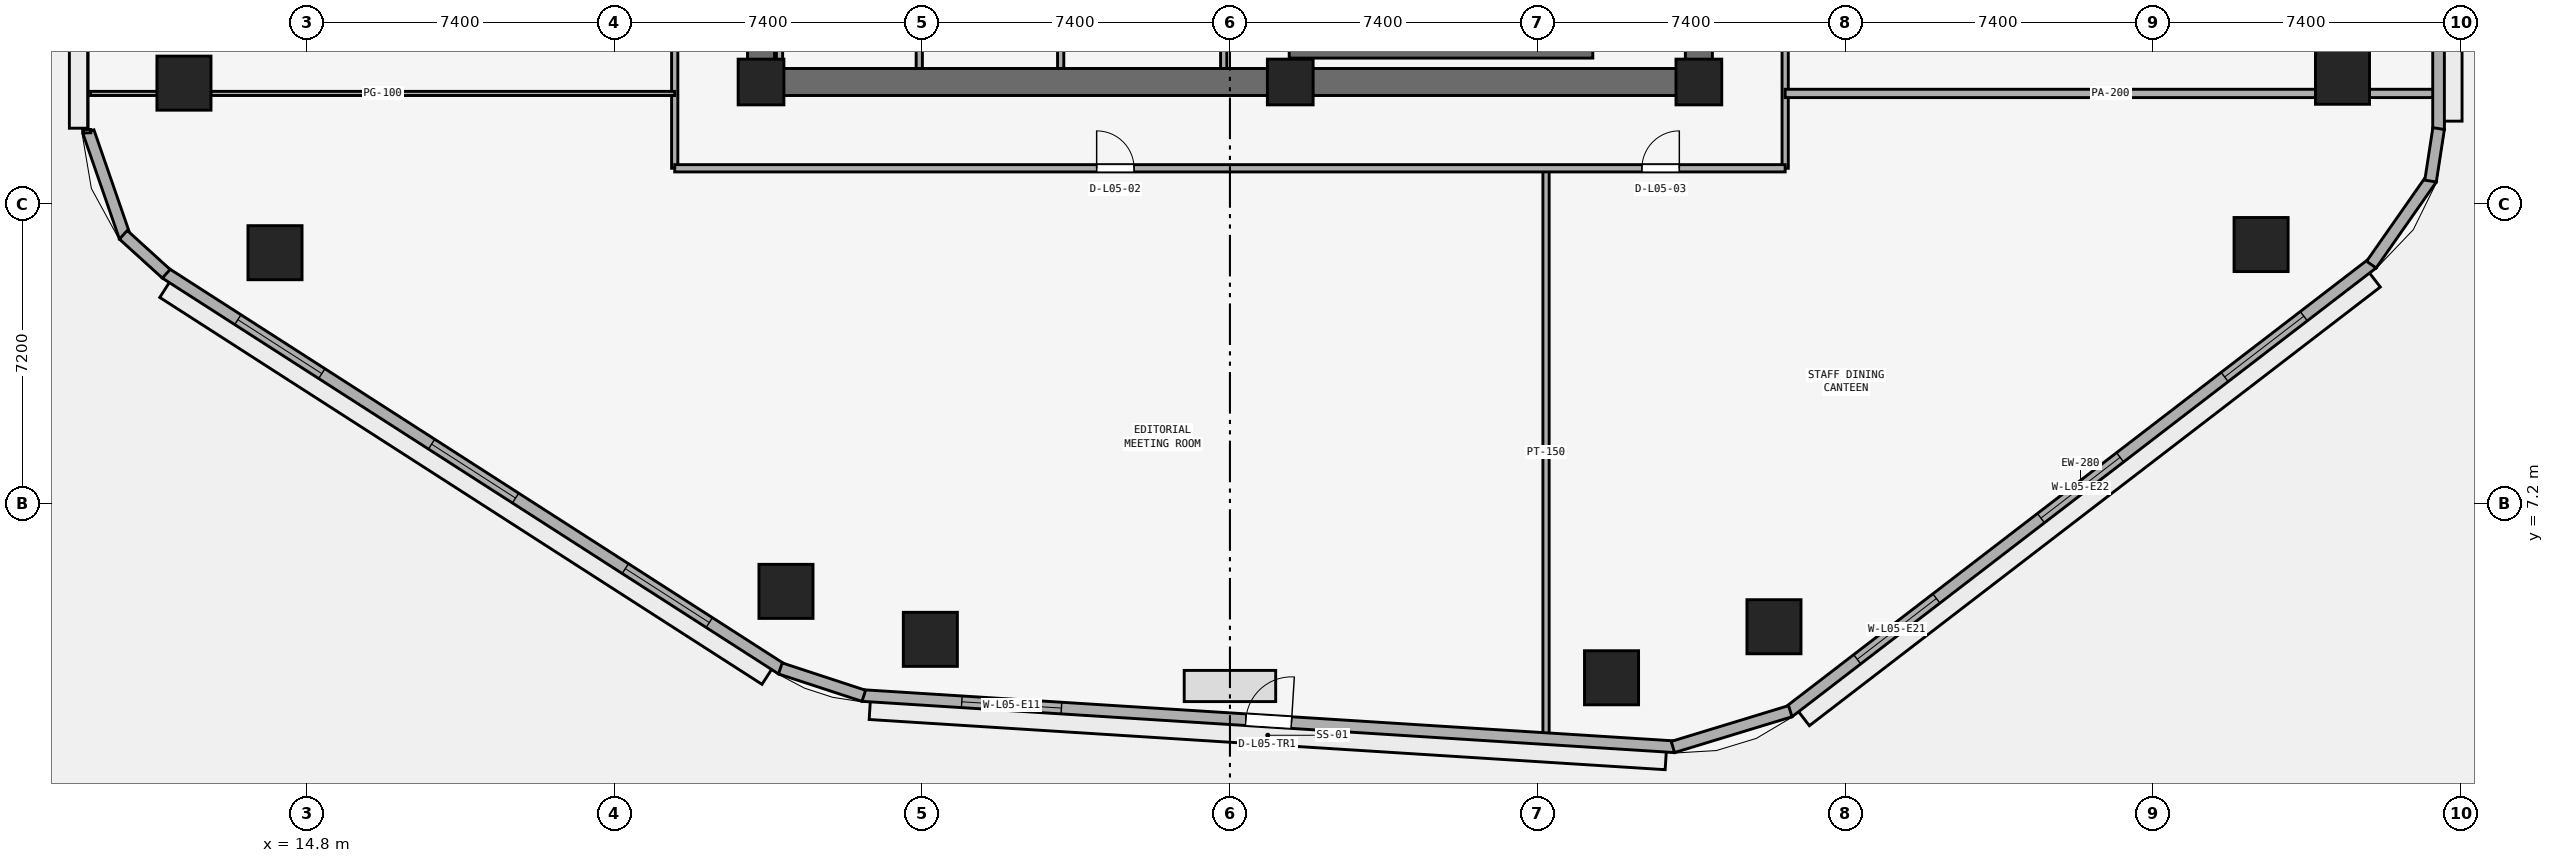
"""IFC4 building model, lengths in metres.
Left out: names, types, materials, properties, quantities, classifications, styles, units other than length and angle.
Written with IfcOpenShell. Run it as: python <this file> out.ifc"""

import sys

from ifc_helpers import new_model, si_unit, direction, frame, frame_2d, origin, origin_2d, place, context, subcontext, project, spatial, rectangle, extrude, element, fill, save


model = new_model("IFC4")
c1 = context("Model", 3, precision=1e-05, world=origin(), true_north=direction((0.0, 1.0)))
c2 = subcontext(c1, "Body", "Model", "MODEL_VIEW")
j1 = project(units=[si_unit("LENGTHUNIT", "METRE"), si_unit("PLANEANGLEUNIT", "RADIAN")], contexts=[c1])
p1 = place(None, origin())
s1 = spatial("IfcSite", under=j1, at=p1, CompositionType="ELEMENT")
p2 = place(p1, origin())
s2 = spatial("IfcBuilding", under=s1, at=p2, CompositionType="ELEMENT")
p3 = place(p2, frame((0.0, 0.0, 25.0)))
s3 = spatial("IfcBuildingStorey", under=s2, at=p3, CompositionType="ELEMENT", Elevation=25.0)
p4 = place(p3, frame((25.4, 17.325, 0.0), z_axis=(0.0, 0.0, 1.0), x_axis=(1.0, 0.0, 0.0)))
e1 = element("IfcWall", 1, at=p4, inside=s3, PredefinedType="SHEAR", context=c2, shape_type="SweptSolid", body=[
    extrude(rectangle(XDim=23.2, YDim=0.65, at=frame_2d((11.6, 0.0))), origin(), (0.0, 0.0, 1.0), 3.525),
])
p5 = place(p3, frame((25.725, 17.65, 0.0), z_axis=(0.0, 0.0, 1.0), x_axis=(0.0, 1.0, 0.0)))
e2 = element("IfcWall", 2, at=p5, inside=s3, PredefinedType="SHEAR", context=c2, shape_type="SweptSolid", body=[
    extrude(rectangle(XDim=15.1, YDim=0.65, at=frame_2d((7.55, 0.0))), origin(), (0.0, 0.0, 1.0), 3.525),
])
p6 = place(p5, frame((6.8, 0.0, 0.0)))
e3 = element("IfcOpeningElement", 3, at=p6, cuts=e2, PredefinedType="OPENING", context=c2, shape_type="SweptSolid", body=[
    extrude(rectangle(XDim=1.5, YDim=2.15, at=frame_2d((0.75, 1.075))), frame((0.0, 0.335, 0.0), z_axis=(0.0, -1.0, 0.0), x_axis=(1.0, 0.0, 0.0)), (0.0, 0.0, 1.0), 0.67),
])
p7 = place(p3, frame((48.275, 17.65, 0.0), z_axis=(0.0, 0.0, 1.0), x_axis=(0.0, 1.0, 0.0)))
e4 = element("IfcWall", 4, at=p7, inside=s3, PredefinedType="SHEAR", context=c2, shape_type="SweptSolid", body=[
    extrude(rectangle(XDim=15.1, YDim=0.65, at=frame_2d((7.55, 0.0))), origin(), (0.0, 0.0, 1.0), 3.525),
])
p8 = place(p7, frame((5.65, 0.0, 0.0)))
e5 = element("IfcOpeningElement", 5, at=p8, cuts=e4, PredefinedType="OPENING", context=c2, shape_type="SweptSolid", body=[
    extrude(rectangle(XDim=1.5, YDim=2.15, at=frame_2d((0.75, 1.075))), frame((0.0, 0.335, 0.0), z_axis=(0.0, -1.0, 0.0), x_axis=(1.0, 0.0, 0.0)), (0.0, 0.0, 1.0), 0.67),
])
for number, where, z_axis, x_axis in (
    (6, (25.725, 17.325, 0.0), (0.0, 0.0, 1.0), (1.0, 0.0, 0.0)),
    (7, (38.45, 17.325, 0.0), (0.0, 0.0, 1.0), (1.0, 0.0, 0.0)),
    (8, (48.275, 17.325, 0.0), (0.0, 0.0, 1.0), (1.0, 0.0, 0.0)),
):
    element("IfcColumn", number, at=place(p3, frame(where, z_axis=z_axis, x_axis=x_axis)), inside=s3, PredefinedType="PILASTER", context=c2, shape_type="SweptSolid", body=[
        extrude(rectangle(XDim=1.1, YDim=1.1, at=origin_2d()), origin(), (0.0, 0.0, 1.0), 3.8),
    ])
for number, where, z_axis, x_axis in (
    (9, (29.796, 3.922, 0.0), (0.0, 0.0, 1.0), (1.0, 0.0, 0.0)),
    (10, (46.175, 2.998, 0.0), (0.0, 0.0, 1.0), (1.0, 0.0, 0.0)),
    (11, (50.081, 4.225, 0.0), (0.0, 0.0, 1.0), (1.0, 0.0, 0.0)),
    (12, (61.793, 13.416, 0.0), (0.0, 0.0, 1.0), (1.0, 0.0, 0.0)),
    (13, (63.75, 17.44, 0.0), (0.0, 0.0, 1.0), (1.0, 0.0, 0.0)),
    (14, (11.85, 17.298, 0.0), (0.0, 0.0, 1.0), (1.0, 0.0, 0.0)),
    (15, (14.039, 13.22, 0.0), (0.0, 0.0, 1.0), (1.0, 0.0, 0.0)),
    (16, (26.325, 5.076, 0.0), (0.0, 0.0, 1.0), (1.0, 0.0, 0.0)),
):
    element("IfcColumn", number, at=place(p3, frame(where, z_axis=z_axis, x_axis=x_axis)), inside=s3, PredefinedType="COLUMN", context=c2, shape_type="SweptSolid", body=[
        extrude(rectangle(XDim=1.3, YDim=1.3, at=origin_2d()), origin(), (0.0, 0.0, 1.0), 3.8),
    ])
p9 = place(p3, frame((38.425, 18.025, 0.0), z_axis=(0.0, 0.0, 1.0), x_axis=(1.0, 0.0, 0.0)))
e17 = element("IfcWall", 17, at=p9, inside=s3, PredefinedType="SHEAR", context=c2, shape_type="SweptSolid", body=[
    extrude(rectangle(XDim=7.3, YDim=0.25, at=frame_2d((3.65, 0.0))), origin(), (0.0, 0.0, 1.0), 3.525),
])
for number, where, z_axis, x_axis in (
    (18, (26.17, 17.65, 0.0), (0.0, 0.0, 1.0), (0.0, 1.0, 0.0)),
    (19, (29.53, 17.65, 0.0), (0.0, 0.0, 1.0), (0.0, 1.0, 0.0)),
    (20, (32.93, 17.65, 0.0), (0.0, 0.0, 1.0), (0.0, 1.0, 0.0)),
    (21, (36.85, 17.65, 0.0), (0.0, 0.0, 1.0), (0.0, 1.0, 0.0)),
):
    element("IfcWall", number, at=place(p3, frame(where, z_axis=z_axis, x_axis=x_axis)), inside=s3, PredefinedType="PARTITIONING", context=c2, shape_type="SweptSolid", body=[
        extrude(rectangle(XDim=2.1, YDim=0.15, at=frame_2d((1.05, 0.0))), origin(), (0.0, 0.0, 1.0), 3.525),
    ])
p10 = place(p3, frame((50.35, 15.25, 0.0), z_axis=(0.0, 0.0, 1.0), x_axis=(0.0, 1.0, 0.0)))
e22 = element("IfcWall", 22, at=p10, inside=s3, PredefinedType="PARTITIONING", context=c2, shape_type="SweptSolid", body=[
    extrude(rectangle(XDim=19.9, YDim=0.15, at=frame_2d((9.95, 0.0))), origin(), (0.0, 0.0, 1.0), 3.525),
])
p11 = place(p10, frame((7.825, 0.0, 0.0)))
e23 = element("IfcOpeningElement", 23, at=p11, cuts=e22, PredefinedType="OPENING", context=c2, shape_type="SweptSolid", body=[
    extrude(rectangle(XDim=0.9, YDim=2.1, at=frame_2d((0.45, 1.05))), frame((0.0, 0.085, 0.0), z_axis=(0.0, -1.0, 0.0), x_axis=(1.0, 0.0, 0.0)), (0.0, 0.0, 1.0), 0.17),
])
p12 = place(p10, frame((15.925, 0.0, 0.0)))
e24 = element("IfcOpeningElement", 24, at=p12, cuts=e22, PredefinedType="OPENING", context=c2, shape_type="SweptSolid", body=[
    extrude(rectangle(XDim=1.0, YDim=2.12, at=frame_2d((0.5, 1.06))), frame((0.0, 0.085, 0.0), z_axis=(0.0, -1.0, 0.0), x_axis=(1.0, 0.0, 0.0)), (0.0, 0.0, 1.0), 0.17),
])
p13 = place(p3, frame((44.6, 1.599, 0.0), z_axis=(0.0, 0.0, 1.0), x_axis=(0.0, 1.0, 0.0)))
e25 = element("IfcWall", 25, at=p13, inside=s3, PredefinedType="PARTITIONING", context=c2, shape_type="SweptSolid", body=[
    extrude(rectangle(XDim=13.651, YDim=0.15, at=frame_2d((6.825, 0.0))), origin(), (0.0, 0.0, 1.0), 3.525),
])
p14 = place(p3, frame((23.65, 15.25, 0.0), z_axis=(0.0, 0.0, 1.0), x_axis=(0.0, 1.0, 0.0)))
e26 = element("IfcWall", 26, at=p14, inside=s3, PredefinedType="PARTITIONING", context=c2, shape_type="SweptSolid", body=[
    extrude(rectangle(XDim=19.9, YDim=0.15, at=frame_2d((9.95, 0.0))), origin(), (0.0, 0.0, 1.0), 3.525),
])
p15 = place(p14, frame((9.5, 0.0, 0.0)))
e27 = element("IfcOpeningElement", 27, at=p15, cuts=e26, PredefinedType="OPENING", context=c2, shape_type="SweptSolid", body=[
    extrude(rectangle(XDim=0.9, YDim=2.1, at=frame_2d((0.45, 1.05))), frame((0.0, 0.085, 0.0), z_axis=(0.0, -1.0, 0.0), x_axis=(1.0, 0.0, 0.0)), (0.0, 0.0, 1.0), 0.17),
])
p16 = place(p3, frame((23.65, 15.25, 0.0), z_axis=(0.0, 0.0, 1.0), x_axis=(1.0, 0.0, 0.0)))
e28 = element("IfcWall", 28, at=p16, inside=s3, PredefinedType="PARTITIONING", context=c2, shape_type="SweptSolid", body=[
    extrude(rectangle(XDim=26.7, YDim=0.175, at=frame_2d((13.35, 0.0))), origin(), (0.0, 0.0, 1.0), 3.525),
])
p17 = place(p16, frame((10.145, 0.0, 0.0)))
e29 = element("IfcOpeningElement", 29, at=p17, cuts=e28, PredefinedType="OPENING", context=c2, shape_type="SweptSolid", body=[
    extrude(rectangle(XDim=0.9, YDim=2.1, at=frame_2d((0.45, 1.05))), frame((0.0, 0.097, 0.0), z_axis=(0.0, -1.0, 0.0), x_axis=(1.0, 0.0, 0.0)), (0.0, 0.0, 1.0), 0.195),
])
p18 = place(p16, frame((23.255, 0.0, 0.0)))
e30 = element("IfcOpeningElement", 30, at=p18, cuts=e28, PredefinedType="OPENING", context=c2, shape_type="SweptSolid", body=[
    extrude(rectangle(XDim=0.9, YDim=2.1, at=frame_2d((0.45, 1.05))), frame((0.0, 0.097, 0.0), z_axis=(0.0, -1.0, 0.0), x_axis=(1.0, 0.0, 0.0)), (0.0, 0.0, 1.0), 0.195),
])
p19 = place(p3, frame((9.605, 17.05, 0.0), z_axis=(0.0, 0.0, 1.0), x_axis=(1.0, 0.0, 0.0)))
e31 = element("IfcWall", 31, at=p19, inside=s3, PredefinedType="PARTITIONING", context=c2, shape_type="SweptSolid", body=[
    extrude(rectangle(XDim=14.045, YDim=0.1, at=frame_2d((7.022, 0.0))), origin(), (0.0, 0.0, 1.0), 3.525),
])
p20 = place(p3, frame((50.35, 17.05, 0.0), z_axis=(0.0, 0.0, 1.0), x_axis=(1.0, 0.0, 0.0)))
e32 = element("IfcWall", 32, at=p20, inside=s3, PredefinedType="PARTITIONING", context=c2, shape_type="SweptSolid", body=[
    extrude(rectangle(XDim=15.645, YDim=0.2, at=frame_2d((7.823, 0.0))), origin(), (0.0, 0.0, 1.0), 3.525),
])
p21 = place(p3, frame((28.161, 2.571, 0.0), z_axis=(0.0, 0.0, 1.0), x_axis=(0.998017288298, -0.06294038654, 0.0)))
e33 = element("IfcWall", 33, at=p21, inside=s3, PredefinedType="STANDARD", context=c2, shape_type="SweptSolid", body=[
    extrude(rectangle(XDim=19.577, YDim=0.28, at=frame_2d((9.789, 0.0))), origin(), (0.0, 0.0, 1.0), 3.525),
])
p22 = place(p21, frame((9.238, 0.0, 0.0)))
e34 = element("IfcOpeningElement", 34, at=p22, cuts=e33, PredefinedType="OPENING", context=c2, shape_type="SweptSolid", body=[
    extrude(rectangle(XDim=1.1, YDim=2.2, at=frame_2d((0.55, 1.1))), frame((0.0, 0.15, 0.0), z_axis=(0.0, -1.0, 0.0), x_axis=(1.0, 0.0, 0.0)), (0.0, 0.0, 1.0), 0.3),
])
p23 = place(p21, frame((2.396, 0.0, 0.9)))
e35 = element("IfcOpeningElement", 35, at=p23, cuts=e33, PredefinedType="OPENING", context=c2, shape_type="SweptSolid", body=[
    extrude(rectangle(XDim=2.4, YDim=1.75, at=frame_2d((1.2, 0.875))), frame((0.0, 0.15, 0.0), z_axis=(0.0, -1.0, 0.0), x_axis=(1.0, 0.0, 0.0)), (0.0, 0.0, 1.0), 0.3),
])
p24 = place(p3, frame((50.429, 2.172, 0.0), z_axis=(0.0, 0.0, 1.0), x_axis=(0.792937466367, 0.609303023488, 0.0)))
e36 = element("IfcWall", 36, at=p24, inside=s3, PredefinedType="STANDARD", context=c2, shape_type="SweptSolid", body=[
    extrude(rectangle(XDim=17.713, YDim=0.28, at=frame_2d((8.856, 0.0))), origin(), (0.0, 0.0, 1.0), 3.525),
])
p25 = place(p24, frame((2.085, 0.0, 0.9)))
e37 = element("IfcOpeningElement", 37, at=p25, cuts=e36, PredefinedType="OPENING", context=c2, shape_type="SweptSolid", body=[
    extrude(rectangle(XDim=2.4, YDim=1.75, at=frame_2d((1.2, 0.875))), frame((0.0, 0.15, 0.0), z_axis=(0.0, -1.0, 0.0), x_axis=(1.0, 0.0, 0.0)), (0.0, 0.0, 1.0), 0.3),
])
p26 = place(p24, frame((7.656, 0.0, 0.9)))
e38 = element("IfcOpeningElement", 38, at=p26, cuts=e36, PredefinedType="OPENING", context=c2, shape_type="SweptSolid", body=[
    extrude(rectangle(XDim=2.4, YDim=1.75, at=frame_2d((1.2, 0.875))), frame((0.0, 0.15, 0.0), z_axis=(0.0, -1.0, 0.0), x_axis=(1.0, 0.0, 0.0)), (0.0, 0.0, 1.0), 0.3),
])
p27 = place(p24, frame((13.227, 0.0, 0.9)))
e39 = element("IfcOpeningElement", 39, at=p27, cuts=e36, PredefinedType="OPENING", context=c2, shape_type="SweptSolid", body=[
    extrude(rectangle(XDim=2.4, YDim=1.75, at=frame_2d((1.2, 0.875))), frame((0.0, 0.15, 0.0), z_axis=(0.0, -1.0, 0.0), x_axis=(1.0, 0.0, 0.0)), (0.0, 0.0, 1.0), 0.3),
])
p28 = place(p3, frame((66.06, 16.183, 0.0), z_axis=(0.0, 0.0, 1.0), x_axis=(0.0, 1.0, 0.0)))
e40 = element("IfcWall", 40, at=p28, inside=s3, PredefinedType="STANDARD", context=c2, shape_type="SweptSolid", body=[
    extrude(rectangle(XDim=19.331, YDim=0.28, at=frame_2d((9.666, 0.0))), origin(), (0.0, 0.0, 1.0), 3.525),
])
p29 = place(p28, frame((9.115, 0.0, 0.0)))
e41 = element("IfcOpeningElement", 41, at=p29, cuts=e40, PredefinedType="OPENING", context=c2, shape_type="SweptSolid", body=[
    extrude(rectangle(XDim=1.1, YDim=2.2, at=frame_2d((0.55, 1.1))), frame((0.0, 0.15, 0.0), z_axis=(0.0, -1.0, 0.0), x_axis=(1.0, 0.0, 0.0)), (0.0, 0.0, 1.0), 0.3),
])
p30 = place(p28, frame((2.355, 0.0, 0.9)))
e42 = element("IfcOpeningElement", 42, at=p30, cuts=e40, PredefinedType="OPENING", context=c2, shape_type="SweptSolid", body=[
    extrude(rectangle(XDim=2.4, YDim=1.75, at=frame_2d((1.2, 0.875))), frame((0.0, 0.15, 0.0), z_axis=(0.0, -1.0, 0.0), x_axis=(1.0, 0.0, 0.0)), (0.0, 0.0, 1.0), 0.3),
])
p31 = place(p28, frame((14.326, 0.0, 0.9)))
e43 = element("IfcOpeningElement", 43, at=p31, cuts=e40, PredefinedType="OPENING", context=c2, shape_type="SweptSolid", body=[
    extrude(rectangle(XDim=2.4, YDim=1.75, at=frame_2d((1.2, 0.875))), frame((0.0, 0.15, 0.0), z_axis=(0.0, -1.0, 0.0), x_axis=(1.0, 0.0, 0.0)), (0.0, 0.0, 1.0), 0.3),
])
p32 = place(p3, frame((11.405, 12.728, 0.0), z_axis=(0.0, 0.0, 1.0), x_axis=(0.841304564637, -0.540561402175, 0.0)))
e44 = element("IfcWall", 44, at=p32, inside=s3, PredefinedType="STANDARD", context=c2, shape_type="SweptSolid", body=[
    extrude(rectangle(XDim=17.612, YDim=0.28, at=frame_2d((8.806, 0.0))), origin(), (0.0, 0.0, 1.0), 3.525),
])
p33 = place(p32, frame((2.069, 0.0, 0.9)))
e45 = element("IfcOpeningElement", 45, at=p33, cuts=e44, PredefinedType="OPENING", context=c2, shape_type="SweptSolid", body=[
    extrude(rectangle(XDim=2.4, YDim=1.75, at=frame_2d((1.2, 0.875))), frame((0.0, 0.15, 0.0), z_axis=(0.0, -1.0, 0.0), x_axis=(1.0, 0.0, 0.0)), (0.0, 0.0, 1.0), 0.3),
])
p34 = place(p32, frame((7.606, 0.0, 0.9)))
e46 = element("IfcOpeningElement", 46, at=p34, cuts=e44, PredefinedType="OPENING", context=c2, shape_type="SweptSolid", body=[
    extrude(rectangle(XDim=2.4, YDim=1.75, at=frame_2d((1.2, 0.875))), frame((0.0, 0.15, 0.0), z_axis=(0.0, -1.0, 0.0), x_axis=(1.0, 0.0, 0.0)), (0.0, 0.0, 1.0), 0.3),
])
p35 = place(p32, frame((13.143, 0.0, 0.9)))
e47 = element("IfcOpeningElement", 47, at=p35, cuts=e44, PredefinedType="OPENING", context=c2, shape_type="SweptSolid", body=[
    extrude(rectangle(XDim=2.4, YDim=1.75, at=frame_2d((1.2, 0.875))), frame((0.0, 0.15, 0.0), z_axis=(0.0, -1.0, 0.0), x_axis=(1.0, 0.0, 0.0)), (0.0, 0.0, 1.0), 0.3),
])
p36 = place(p3, frame((47.65, 1.333, 0.0), z_axis=(0.0, 0.0, 1.0), x_axis=(0.956461287977, 0.291859220516, 0.0)))
e48 = element("IfcWall", 48, at=p36, inside=s3, PredefinedType="STANDARD", context=c2, shape_type="SweptSolid", body=[
    extrude(rectangle(XDim=2.952, YDim=0.28, at=frame_2d((1.476, 0.0))), origin(), (0.0, 0.0, 1.0), 3.525),
])
p37 = place(p3, frame((64.444, 12.933, 0.0), z_axis=(0.0, 0.0, 1.0), x_axis=(0.573176686443, 0.819431806875, 0.0)))
e49 = element("IfcWall", 49, at=p37, inside=s3, PredefinedType="STANDARD", context=c2, shape_type="SweptSolid", body=[
    extrude(rectangle(XDim=2.524, YDim=0.28, at=frame_2d((1.262, 0.0))), origin(), (0.0, 0.0, 1.0), 3.525),
])
p38 = place(p3, frame((65.867, 14.943, 0.0), z_axis=(0.0, 0.0, 1.0), x_axis=(0.152014078361, 0.988378328364, 0.0)))
e50 = element("IfcWall", 50, at=p38, inside=s3, PredefinedType="STANDARD", context=c2, shape_type="SweptSolid", body=[
    extrude(rectangle(XDim=1.277, YDim=0.28, at=frame_2d((0.638, 0.0))), origin(), (0.0, 0.0, 1.0), 3.525),
])
p39 = place(p3, frame((9.554, 16.128, 0.0), z_axis=(0.0, 0.0, 1.0), x_axis=(0.327019907236, -0.945017449718, 0.0)))
e51 = element("IfcWall", 51, at=p39, inside=s3, PredefinedType="STANDARD", context=c2, shape_type="SweptSolid", body=[
    extrude(rectangle(XDim=2.682, YDim=0.28, at=frame_2d((1.341, 0.0))), origin(), (0.0, 0.0, 1.0), 3.525),
])
p40 = place(p3, frame((10.393, 13.651, 0.0), z_axis=(0.0, 0.0, 1.0), x_axis=(0.74003521851, -0.672568119498, 0.0)))
e52 = element("IfcWall", 52, at=p40, inside=s3, PredefinedType="STANDARD", context=c2, shape_type="SweptSolid", body=[
    extrude(rectangle(XDim=1.393, YDim=0.28, at=frame_2d((0.697, 0.0))), origin(), (0.0, 0.0, 1.0), 3.525),
])
p41 = place(p3, frame((26.19, 3.223, 0.0), z_axis=(0.0, 0.0, 1.0), x_axis=(0.95016442175, -0.311749212734, 0.0)))
e53 = element("IfcWall", 53, at=p41, inside=s3, PredefinedType="STANDARD", context=c2, shape_type="SweptSolid", body=[
    extrude(rectangle(XDim=2.111, YDim=0.28, at=frame_2d((1.056, 0.0))), origin(), (0.0, 0.0, 1.0), 3.525),
])
p42 = place(p17, origin())
e54 = element("IfcDoor", 54, at=p42, inside=s3, OperationType="SINGLE_SWING_LEFT", PredefinedType="DOOR", context=c2, shape_type="SweptSolid", body=[
    extrude(rectangle(XDim=0.9, YDim=2.1, at=frame_2d((0.45, 1.05))), frame((0.0, 0.025, 0.0), z_axis=(0.0, -1.0, 0.0), x_axis=(1.0, 0.0, 0.0)), (0.0, 0.0, 1.0), 0.05),
])
fill(e29, e54)
p43 = place(p18, origin())
e55 = element("IfcDoor", 55, at=p43, inside=s3, OperationType="SINGLE_SWING_RIGHT", PredefinedType="DOOR", context=c2, shape_type="SweptSolid", body=[
    extrude(rectangle(XDim=0.9, YDim=2.1, at=frame_2d((0.45, 1.05))), frame((0.0, 0.025, 0.0), z_axis=(0.0, -1.0, 0.0), x_axis=(1.0, 0.0, 0.0)), (0.0, 0.0, 1.0), 0.05),
])
fill(e30, e55)
p44 = place(p22, origin())
e56 = element("IfcDoor", 56, at=p44, inside=s3, OperationType="SINGLE_SWING_RIGHT", PredefinedType="DOOR", context=c2, shape_type="SweptSolid", body=[
    extrude(rectangle(XDim=1.1, YDim=2.2, at=frame_2d((0.55, 1.1))), frame((0.0, 0.025, 0.0), z_axis=(0.0, -1.0, 0.0), x_axis=(1.0, 0.0, 0.0)), (0.0, 0.0, 1.0), 0.05),
])
fill(e34, e56)
p45 = place(p23, origin())
e57 = element("IfcWindow", 57, at=p45, inside=s3, PartitioningType="SINGLE_PANEL", PredefinedType="WINDOW", context=c2, shape_type="SweptSolid", body=[
    extrude(rectangle(XDim=2.4, YDim=1.75, at=frame_2d((1.2, 0.875))), frame((0.0, 0.03, 0.0), z_axis=(0.0, -1.0, 0.0), x_axis=(1.0, 0.0, 0.0)), (0.0, 0.0, 1.0), 0.06),
])
fill(e35, e57)
p46 = place(p25, origin())
e58 = element("IfcWindow", 58, at=p46, inside=s3, PartitioningType="SINGLE_PANEL", PredefinedType="WINDOW", context=c2, shape_type="SweptSolid", body=[
    extrude(rectangle(XDim=2.4, YDim=1.75, at=frame_2d((1.2, 0.875))), frame((0.0, 0.03, 0.0), z_axis=(0.0, -1.0, 0.0), x_axis=(1.0, 0.0, 0.0)), (0.0, 0.0, 1.0), 0.06),
])
fill(e37, e58)
p47 = place(p26, origin())
e59 = element("IfcWindow", 59, at=p47, inside=s3, PartitioningType="SINGLE_PANEL", PredefinedType="WINDOW", context=c2, shape_type="SweptSolid", body=[
    extrude(rectangle(XDim=2.4, YDim=1.75, at=frame_2d((1.2, 0.875))), frame((0.0, 0.03, 0.0), z_axis=(0.0, -1.0, 0.0), x_axis=(1.0, 0.0, 0.0)), (0.0, 0.0, 1.0), 0.06),
])
fill(e38, e59)
p48 = place(p27, origin())
e60 = element("IfcWindow", 60, at=p48, inside=s3, PartitioningType="SINGLE_PANEL", PredefinedType="WINDOW", context=c2, shape_type="SweptSolid", body=[
    extrude(rectangle(XDim=2.4, YDim=1.75, at=frame_2d((1.2, 0.875))), frame((0.0, 0.03, 0.0), z_axis=(0.0, -1.0, 0.0), x_axis=(1.0, 0.0, 0.0)), (0.0, 0.0, 1.0), 0.06),
])
fill(e39, e60)
p49 = place(p33, origin())
e61 = element("IfcWindow", 61, at=p49, inside=s3, PartitioningType="SINGLE_PANEL", PredefinedType="WINDOW", context=c2, shape_type="SweptSolid", body=[
    extrude(rectangle(XDim=2.4, YDim=1.75, at=frame_2d((1.2, 0.875))), frame((0.0, 0.03, 0.0), z_axis=(0.0, -1.0, 0.0), x_axis=(1.0, 0.0, 0.0)), (0.0, 0.0, 1.0), 0.06),
])
fill(e45, e61)
p50 = place(p34, origin())
e62 = element("IfcWindow", 62, at=p50, inside=s3, PartitioningType="SINGLE_PANEL", PredefinedType="WINDOW", context=c2, shape_type="SweptSolid", body=[
    extrude(rectangle(XDim=2.4, YDim=1.75, at=frame_2d((1.2, 0.875))), frame((0.0, 0.03, 0.0), z_axis=(0.0, -1.0, 0.0), x_axis=(1.0, 0.0, 0.0)), (0.0, 0.0, 1.0), 0.06),
])
fill(e46, e62)
p51 = place(p35, origin())
e63 = element("IfcWindow", 63, at=p51, inside=s3, PartitioningType="SINGLE_PANEL", PredefinedType="WINDOW", context=c2, shape_type="SweptSolid", body=[
    extrude(rectangle(XDim=2.4, YDim=1.75, at=frame_2d((1.2, 0.875))), frame((0.0, 0.03, 0.0), z_axis=(0.0, -1.0, 0.0), x_axis=(1.0, 0.0, 0.0)), (0.0, 0.0, 1.0), 0.06),
])
fill(e47, e63)
save(model, sys.argv[1])
